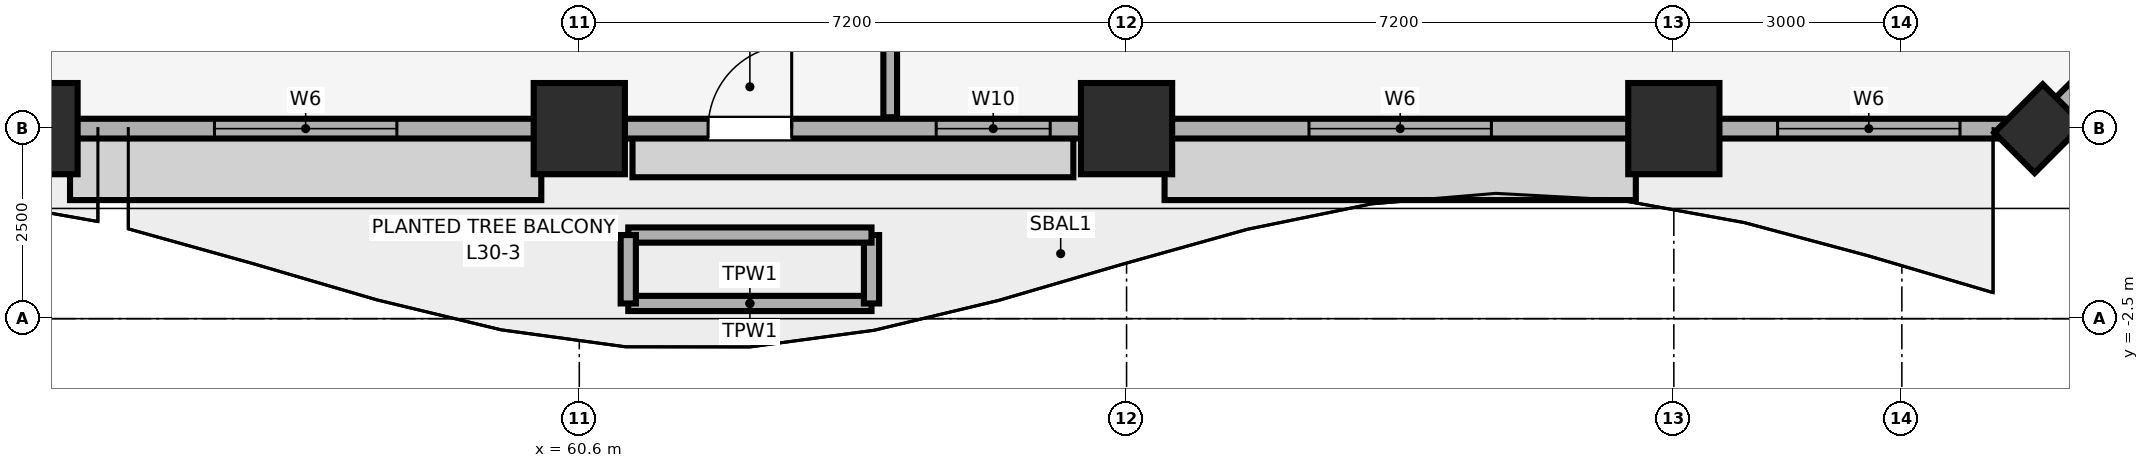
"""IFC4 building model, lengths in metres.
Left out: names, types, materials, properties, quantities, classifications, styles, units other than length and angle.
Written with IfcOpenShell. Run it as: python <this file> out.ifc"""

import sys

from ifc_helpers import new_model, si_unit, direction, frame, frame_2d, origin, origin_2d, place, context, subcontext, project, spatial, rectangle, extrude, element, fill, save


model = new_model("IFC4")
c1 = context("Model", 3, precision=1e-05, world=origin(), true_north=direction((0.0, 1.0)))
c2 = subcontext(c1, "Body", "Model", "MODEL_VIEW")
j1 = project(units=[si_unit("LENGTHUNIT", "METRE"), si_unit("PLANEANGLEUNIT", "RADIAN")], contexts=[c1])
p1 = place(None, origin())
s1 = spatial("IfcSite", under=j1, at=p1, CompositionType="ELEMENT")
p2 = place(p1, origin())
s2 = spatial("IfcBuilding", under=s1, at=p2, CompositionType="ELEMENT")
p3 = place(p2, frame((0.0, 0.0, 126.8)))
s3 = spatial("IfcBuildingStorey", under=s2, at=p3, CompositionType="ELEMENT", Elevation=126.8)
for number, where, z_axis, x_axis in (
    (1, (53.4, 0.0, 0.0), (0.0, 0.0, 1.0), (1.0, 0.0, 0.0)),
    (2, (60.6, 0.0, 0.0), (0.0, 0.0, 1.0), (1.0, 0.0, 0.0)),
    (3, (67.8, 0.0, 0.0), (0.0, 0.0, 1.0), (1.0, 0.0, 0.0)),
    (4, (75.0, 0.0, 0.0), (0.0, 0.0, 1.0), (1.0, 0.0, 0.0)),
):
    element("IfcColumn", number, at=place(p3, frame(where, z_axis=z_axis, x_axis=x_axis)), inside=s3, PredefinedType="COLUMN", context=c2, shape_type="SweptSolid", body=[
        extrude(rectangle(XDim=1.2, YDim=1.2, at=origin_2d()), origin(), (0.0, 0.0, 1.0), 3.51),
    ])
p4 = place(p3, frame((79.8, 0.0, 0.0), z_axis=(0.0, 0.0, 1.0), x_axis=(0.707106781187, 0.707106781187, 0.0)))
e5 = element("IfcColumn", 5, at=p4, inside=s3, PredefinedType="PILASTER", context=c2, shape_type="SweptSolid", body=[
    extrude(rectangle(XDim=0.9, YDim=0.75, at=origin_2d()), origin(), (0.0, 0.0, 1.0), 3.51),
])
p5 = place(p3, frame((4.2, 0.0, 0.0), z_axis=(0.0, 0.0, 1.0), x_axis=(1.0, 0.0, 0.0)))
e6 = element("IfcWall", 6, at=p5, inside=s3, PredefinedType="SOLIDWALL", context=c2, shape_type="SweptSolid", body=[
    extrude(rectangle(XDim=75.6, YDim=0.26, at=frame_2d((37.8, 0.0))), origin(), (0.0, 0.0, 1.0), 2.56),
])
p6 = place(p5, frame((21.383, 0.0, 0.0)))
e7 = element("IfcOpeningElement", 7, at=p6, cuts=e6, PredefinedType="OPENING", context=c2, shape_type="SweptSolid", body=[
    extrude(rectangle(XDim=1.1, YDim=2.15, at=frame_2d((0.55, 1.075))), frame((0.0, 0.14, 0.0), z_axis=(0.0, -1.0, 0.0), x_axis=(1.0, 0.0, 0.0)), (0.0, 0.0, 1.0), 0.28),
])
p7 = place(p5, frame((36.432, 0.0, 0.0)))
e8 = element("IfcOpeningElement", 8, at=p7, cuts=e6, PredefinedType="OPENING", context=c2, shape_type="SweptSolid", body=[
    extrude(rectangle(XDim=1.1, YDim=2.15, at=frame_2d((0.55, 1.075))), frame((0.0, 0.14, 0.0), z_axis=(0.0, -1.0, 0.0), x_axis=(1.0, 0.0, 0.0)), (0.0, 0.0, 1.0), 0.28),
])
p8 = place(p5, frame((58.094, 0.0, 0.0)))
e9 = element("IfcOpeningElement", 9, at=p8, cuts=e6, PredefinedType="OPENING", context=c2, shape_type="SweptSolid", body=[
    extrude(rectangle(XDim=1.1, YDim=2.15, at=frame_2d((0.55, 1.075))), frame((0.0, 0.14, 0.0), z_axis=(0.0, -1.0, 0.0), x_axis=(1.0, 0.0, 0.0)), (0.0, 0.0, 1.0), 0.28),
])
p9 = place(p5, frame((1.035, 0.0, 0.85)))
e10 = element("IfcOpeningElement", 10, at=p9, cuts=e6, PredefinedType="OPENING", context=c2, shape_type="SweptSolid", body=[
    extrude(rectangle(XDim=2.4, YDim=1.5, at=frame_2d((1.2, 0.75))), frame((0.0, 0.14, 0.0), z_axis=(0.0, -1.0, 0.0), x_axis=(1.0, 0.0, 0.0)), (0.0, 0.0, 1.0), 0.28),
])
p10 = place(p5, frame((7.2, 0.0, 0.85)))
e11 = element("IfcOpeningElement", 11, at=p10, cuts=e6, PredefinedType="OPENING", context=c2, shape_type="SweptSolid", body=[
    extrude(rectangle(XDim=2.4, YDim=1.5, at=frame_2d((1.2, 0.75))), frame((0.0, 0.14, 0.0), z_axis=(0.0, -1.0, 0.0), x_axis=(1.0, 0.0, 0.0)), (0.0, 0.0, 1.0), 0.28),
])
p11 = place(p5, frame((13.055, 0.0, 0.85)))
e12 = element("IfcOpeningElement", 12, at=p11, cuts=e6, PredefinedType="OPENING", context=c2, shape_type="SweptSolid", body=[
    extrude(rectangle(XDim=1.5, YDim=1.4, at=frame_2d((0.75, 0.7))), frame((0.0, 0.14, 0.0), z_axis=(0.0, -1.0, 0.0), x_axis=(1.0, 0.0, 0.0)), (0.0, 0.0, 1.0), 0.28),
])
p12 = place(p5, frame((15.805, 0.0, 0.85)))
e13 = element("IfcOpeningElement", 13, at=p12, cuts=e6, PredefinedType="OPENING", context=c2, shape_type="SweptSolid", body=[
    extrude(rectangle(XDim=2.4, YDim=1.5, at=frame_2d((1.2, 0.75))), frame((0.0, 0.14, 0.0), z_axis=(0.0, -1.0, 0.0), x_axis=(1.0, 0.0, 0.0)), (0.0, 0.0, 1.0), 0.28),
])
p13 = place(p5, frame((23.127, 0.0, 0.85)))
e14 = element("IfcOpeningElement", 14, at=p13, cuts=e6, PredefinedType="OPENING", context=c2, shape_type="SweptSolid", body=[
    extrude(rectangle(XDim=2.4, YDim=1.5, at=frame_2d((1.2, 0.75))), frame((0.0, 0.14, 0.0), z_axis=(0.0, -1.0, 0.0), x_axis=(1.0, 0.0, 0.0)), (0.0, 0.0, 1.0), 0.28),
])
p14 = place(p5, frame((27.285, 0.0, 0.85)))
e15 = element("IfcOpeningElement", 15, at=p14, cuts=e6, PredefinedType="OPENING", context=c2, shape_type="SweptSolid", body=[
    extrude(rectangle(XDim=2.4, YDim=1.5, at=frame_2d((1.2, 0.75))), frame((0.0, 0.14, 0.0), z_axis=(0.0, -1.0, 0.0), x_axis=(1.0, 0.0, 0.0)), (0.0, 0.0, 1.0), 0.28),
])
p15 = place(p5, frame((30.935, 0.0, 0.85)))
e16 = element("IfcOpeningElement", 16, at=p15, cuts=e6, PredefinedType="OPENING", context=c2, shape_type="SweptSolid", body=[
    extrude(rectangle(XDim=1.5, YDim=1.4, at=frame_2d((0.75, 0.7))), frame((0.0, 0.14, 0.0), z_axis=(0.0, -1.0, 0.0), x_axis=(1.0, 0.0, 0.0)), (0.0, 0.0, 1.0), 0.28),
])
p16 = place(p5, frame((38.451, 0.0, 0.85)))
e17 = element("IfcOpeningElement", 17, at=p16, cuts=e6, PredefinedType="OPENING", context=c2, shape_type="SweptSolid", body=[
    extrude(rectangle(XDim=2.4, YDim=1.5, at=frame_2d((1.2, 0.75))), frame((0.0, 0.14, 0.0), z_axis=(0.0, -1.0, 0.0), x_axis=(1.0, 0.0, 0.0)), (0.0, 0.0, 1.0), 0.28),
])
p17 = place(p5, frame((43.115, 0.0, 0.85)))
e18 = element("IfcOpeningElement", 18, at=p17, cuts=e6, PredefinedType="OPENING", context=c2, shape_type="SweptSolid", body=[
    extrude(rectangle(XDim=1.5, YDim=1.4, at=frame_2d((0.75, 0.7))), frame((0.0, 0.14, 0.0), z_axis=(0.0, -1.0, 0.0), x_axis=(1.0, 0.0, 0.0)), (0.0, 0.0, 1.0), 0.28),
])
p18 = place(p5, frame((45.865, 0.0, 0.85)))
e19 = element("IfcOpeningElement", 19, at=p18, cuts=e6, PredefinedType="OPENING", context=c2, shape_type="SweptSolid", body=[
    extrude(rectangle(XDim=2.4, YDim=1.5, at=frame_2d((1.2, 0.75))), frame((0.0, 0.14, 0.0), z_axis=(0.0, -1.0, 0.0), x_axis=(1.0, 0.0, 0.0)), (0.0, 0.0, 1.0), 0.28),
])
p19 = place(p5, frame((51.6, 0.0, 0.85)))
e20 = element("IfcOpeningElement", 20, at=p19, cuts=e6, PredefinedType="OPENING", context=c2, shape_type="SweptSolid", body=[
    extrude(rectangle(XDim=2.4, YDim=1.5, at=frame_2d((1.2, 0.75))), frame((0.0, 0.14, 0.0), z_axis=(0.0, -1.0, 0.0), x_axis=(1.0, 0.0, 0.0)), (0.0, 0.0, 1.0), 0.28),
])
p20 = place(p5, frame((61.095, 0.0, 0.85)))
e21 = element("IfcOpeningElement", 21, at=p20, cuts=e6, PredefinedType="OPENING", context=c2, shape_type="SweptSolid", body=[
    extrude(rectangle(XDim=1.5, YDim=1.4, at=frame_2d((0.75, 0.7))), frame((0.0, 0.14, 0.0), z_axis=(0.0, -1.0, 0.0), x_axis=(1.0, 0.0, 0.0)), (0.0, 0.0, 1.0), 0.28),
])
p21 = place(p5, frame((66.0, 0.0, 0.85)))
e22 = element("IfcOpeningElement", 22, at=p21, cuts=e6, PredefinedType="OPENING", context=c2, shape_type="SweptSolid", body=[
    extrude(rectangle(XDim=2.4, YDim=1.5, at=frame_2d((1.2, 0.75))), frame((0.0, 0.14, 0.0), z_axis=(0.0, -1.0, 0.0), x_axis=(1.0, 0.0, 0.0)), (0.0, 0.0, 1.0), 0.28),
])
p22 = place(p5, frame((72.165, 0.0, 0.85)))
e23 = element("IfcOpeningElement", 23, at=p22, cuts=e6, PredefinedType="OPENING", context=c2, shape_type="SweptSolid", body=[
    extrude(rectangle(XDim=2.4, YDim=1.5, at=frame_2d((1.2, 0.75))), frame((0.0, 0.14, 0.0), z_axis=(0.0, -1.0, 0.0), x_axis=(1.0, 0.0, 0.0)), (0.0, 0.0, 1.0), 0.28),
])
p23 = place(p3, frame((79.8, 0.0, 0.0), z_axis=(0.0, 0.0, 1.0), x_axis=(0.707106781187, 0.707106781187, 0.0)))
e24 = element("IfcWall", 24, at=p23, inside=s3, PredefinedType="SOLIDWALL", context=c2, shape_type="SweptSolid", body=[
    extrude(rectangle(XDim=5.94, YDim=0.26, at=frame_2d((2.97, 0.0))), origin(), (0.0, 0.0, 1.0), 2.56),
])
p24 = place(p3, frame((61.244, -2.3, 0.0), z_axis=(0.0, 0.0, 1.0), x_axis=(1.0, 0.0, 0.0)))
e25 = element("IfcWall", 25, at=p24, inside=s3, PredefinedType="PARAPET", context=c2, shape_type="SweptSolid", body=[
    extrude(rectangle(XDim=3.2, YDim=0.2, at=frame_2d((1.6, 0.0))), origin(), (0.0, 0.0, 1.0), 0.55),
])
p25 = place(p3, frame((64.444, -2.3, 0.0), z_axis=(0.0, 0.0, 1.0), x_axis=(0.0, 1.0, 0.0)))
e26 = element("IfcWall", 26, at=p25, inside=s3, PredefinedType="PARAPET", context=c2, shape_type="SweptSolid", body=[
    extrude(rectangle(XDim=0.9, YDim=0.2, at=frame_2d((0.45, 0.0))), origin(), (0.0, 0.0, 1.0), 0.55),
])
p26 = place(p3, frame((64.444, -1.4, 0.0), z_axis=(0.0, 0.0, 1.0), x_axis=(-1.0, 0.0, 0.0)))
e27 = element("IfcWall", 27, at=p26, inside=s3, PredefinedType="PARAPET", context=c2, shape_type="SweptSolid", body=[
    extrude(rectangle(XDim=3.2, YDim=0.2, at=frame_2d((1.6, 0.0))), origin(), (0.0, 0.0, 1.0), 0.55),
])
p27 = place(p3, frame((61.244, -1.4, 0.0), z_axis=(0.0, 0.0, 1.0), x_axis=(0.0, -1.0, 0.0)))
e28 = element("IfcWall", 28, at=p27, inside=s3, PredefinedType="PARAPET", context=c2, shape_type="SweptSolid", body=[
    extrude(rectangle(XDim=0.9, YDim=0.2, at=frame_2d((0.45, 0.0))), origin(), (0.0, 0.0, 1.0), 0.55),
])
p28 = place(p3, frame((64.691, 0.15, 0.0), z_axis=(0.0, 0.0, 1.0), x_axis=(0.0, 1.0, 0.0)))
e29 = element("IfcWall", 29, at=p28, inside=s3, PredefinedType="PARTITIONING", context=c2, shape_type="SweptSolid", body=[
    extrude(rectangle(XDim=24.555, YDim=0.18, at=frame_2d((12.278, 0.0))), origin(), (0.0, 0.0, 1.0), 3.51),
])
p29 = place(p8, origin())
e30 = element("IfcDoor", 30, at=p29, inside=s3, OperationType="SINGLE_SWING_RIGHT", PredefinedType="DOOR", context=c2, shape_type="SweptSolid", body=[
    extrude(rectangle(XDim=1.1, YDim=2.15, at=frame_2d((0.55, 1.075))), frame((0.0, 0.025, 0.0), z_axis=(0.0, -1.0, 0.0), x_axis=(1.0, 0.0, 0.0)), (0.0, 0.0, 1.0), 0.05),
])
fill(e9, e30)
p30 = place(p19, origin())
e31 = element("IfcWindow", 31, at=p30, inside=s3, PartitioningType="SINGLE_PANEL", PredefinedType="WINDOW", context=c2, shape_type="SweptSolid", body=[
    extrude(rectangle(XDim=2.4, YDim=1.5, at=frame_2d((1.2, 0.75))), frame((0.0, 0.03, 0.0), z_axis=(0.0, -1.0, 0.0), x_axis=(1.0, 0.0, 0.0)), (0.0, 0.0, 1.0), 0.06),
])
fill(e20, e31)
p31 = place(p20, origin())
e32 = element("IfcWindow", 32, at=p31, inside=s3, PartitioningType="SINGLE_PANEL", PredefinedType="WINDOW", context=c2, shape_type="SweptSolid", body=[
    extrude(rectangle(XDim=1.5, YDim=1.4, at=frame_2d((0.75, 0.7))), frame((0.0, 0.03, 0.0), z_axis=(0.0, -1.0, 0.0), x_axis=(1.0, 0.0, 0.0)), (0.0, 0.0, 1.0), 0.06),
])
fill(e21, e32)
p32 = place(p21, origin())
e33 = element("IfcWindow", 33, at=p32, inside=s3, PartitioningType="SINGLE_PANEL", PredefinedType="WINDOW", context=c2, shape_type="SweptSolid", body=[
    extrude(rectangle(XDim=2.4, YDim=1.5, at=frame_2d((1.2, 0.75))), frame((0.0, 0.03, 0.0), z_axis=(0.0, -1.0, 0.0), x_axis=(1.0, 0.0, 0.0)), (0.0, 0.0, 1.0), 0.06),
])
fill(e22, e33)
p33 = place(p22, origin())
e34 = element("IfcWindow", 34, at=p33, inside=s3, PartitioningType="SINGLE_PANEL", PredefinedType="WINDOW", context=c2, shape_type="SweptSolid", body=[
    extrude(rectangle(XDim=2.4, YDim=1.5, at=frame_2d((1.2, 0.75))), frame((0.0, 0.03, 0.0), z_axis=(0.0, -1.0, 0.0), x_axis=(1.0, 0.0, 0.0)), (0.0, 0.0, 1.0), 0.06),
])
fill(e23, e34)
save(model, sys.argv[1])
